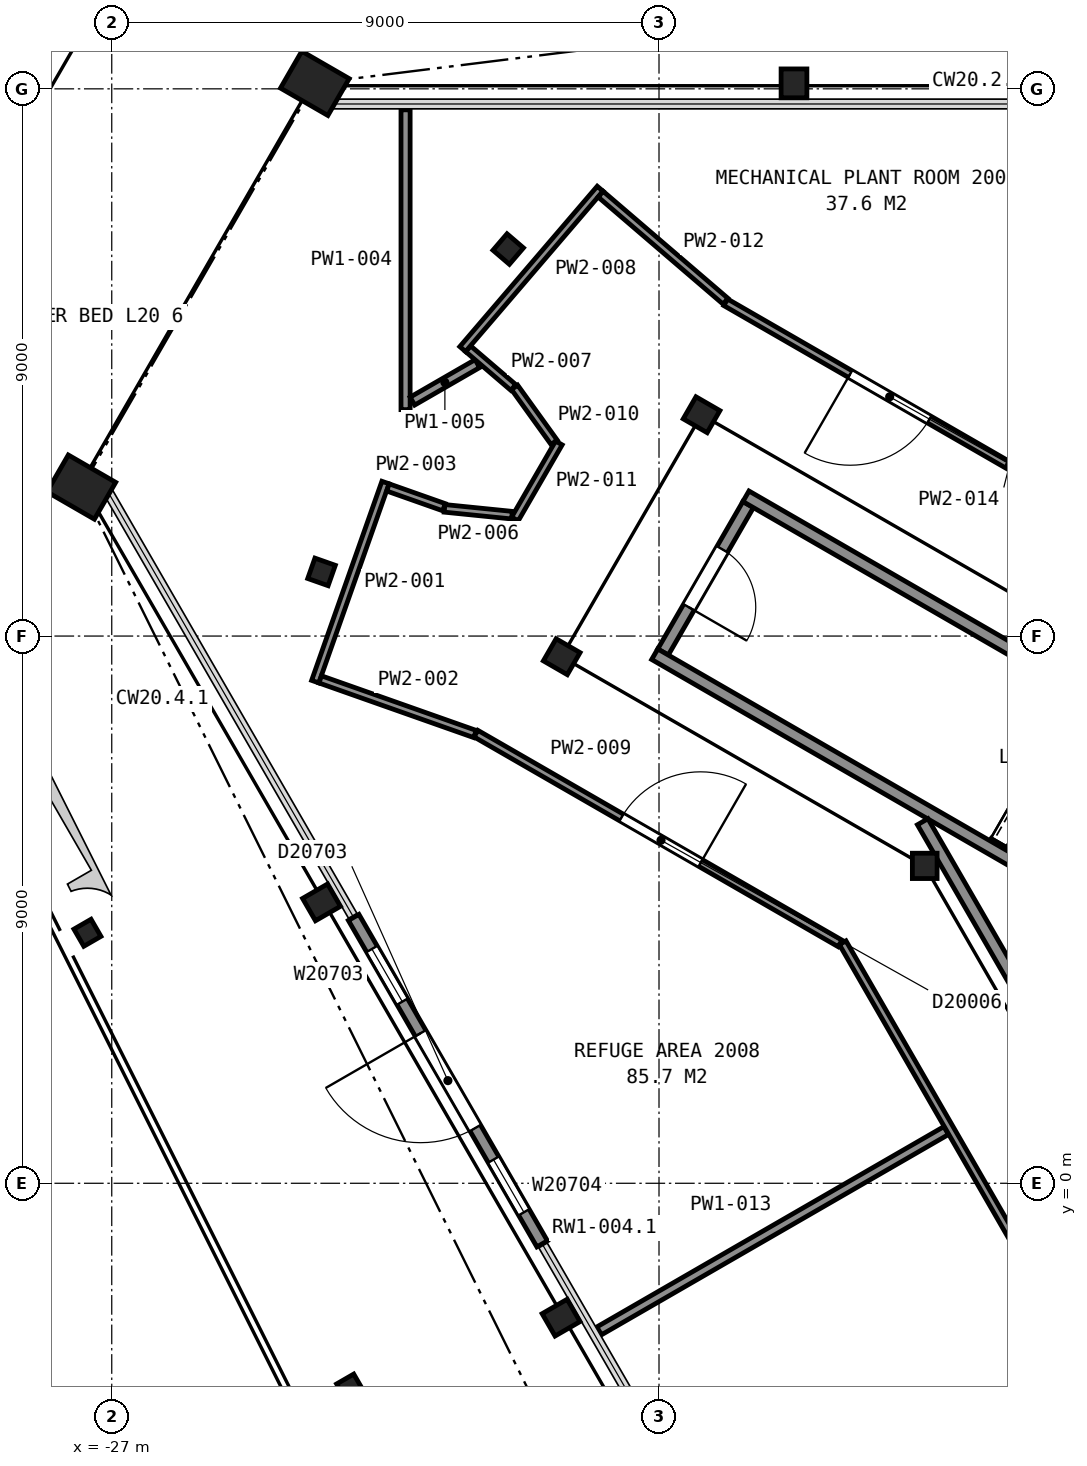
"""IFC4 building model, lengths in metres.
Left out: names, types, materials, properties, quantities, classifications, styles, units other than length and angle.
Written with IfcOpenShell. Run it as: python <this file> out.ifc"""

import sys

from ifc_helpers import new_model, si_unit, direction, frame, frame_2d, origin, origin_2d, place, context, subcontext, project, spatial, rectangle, hollow_rectangle, hollow_circle, i_section, extrude, element, fill, save


model = new_model("IFC4")
c1 = context("Model", 3, precision=1e-05, world=origin(), true_north=direction((0.0, 1.0)))
c2 = subcontext(c1, "Body", "Model", "MODEL_VIEW")
j1 = project(units=[si_unit("LENGTHUNIT", "METRE"), si_unit("PLANEANGLEUNIT", "RADIAN")], contexts=[c1])
p1 = place(None, origin())
s1 = spatial("IfcSite", under=j1, at=p1, CompositionType="ELEMENT")
p2 = place(p1, origin())
s2 = spatial("IfcBuilding", under=s1, at=p2, CompositionType="ELEMENT")
p3 = place(p2, frame((0.0, 0.0, 87.2)))
s3 = spatial("IfcBuildingStorey", under=s2, at=p3, CompositionType="ELEMENT", Elevation=87.2)
p4 = place(p3, frame((-15.78, 18.09, -0.16), z_axis=(0.0, 0.0, 1.0), x_axis=(1.0, 0.0, 0.0)))
e1 = element("IfcColumn", 1, at=p4, inside=s3, PredefinedType="COLUMN", context=c2, shape_type="SweptSolid", body=[
    extrude(i_section(OverallWidth=0.424, OverallDepth=0.475, WebThickness=0.048, FlangeThickness=0.077, FilletRadius=0.015, at=origin_2d()), origin(), (0.0, 0.0, 1.0), 5.76),
])
for number, where, z_axis, x_axis in (
    (2, (-23.66, 18.09, -0.16), (0.0, 0.0, 1.0), (0.5, 0.866, 0.0)),
    (3, (-27.5, 11.45, -0.16), (0.0, 0.0, 1.0), (0.5, 0.866, 0.0)),
):
    element("IfcColumn", number, at=place(p3, frame(where, z_axis=z_axis, x_axis=x_axis)), inside=s3, PredefinedType="COLUMN", context=c2, shape_type="SweptSolid", body=[
        extrude(hollow_rectangle(XDim=0.7, YDim=0.9, WallThickness=0.065, at=origin_2d()), origin(), (0.0, 0.0, 1.0), 5.76),
    ])
for number, where, z_axis, x_axis in (
    (4, (-23.55, 4.62, -0.16), (0.0, 0.0, 1.0), (-0.5, 0.866, 0.0)),
    (5, (-19.61, -2.21, -0.16), (0.0, 0.0, 1.0), (-0.5, 0.866, 0.0)),
):
    element("IfcColumn", number, at=place(p3, frame(where, z_axis=z_axis, x_axis=x_axis)), inside=s3, PredefinedType="COLUMN", context=c2, shape_type="SweptSolid", body=[
        extrude(i_section(OverallWidth=0.424, OverallDepth=0.475, WebThickness=0.048, FlangeThickness=0.077, FilletRadius=0.015, at=origin_2d()), origin(), (0.0, 0.0, 1.0), 5.76),
    ])
for number, where, z_axis, x_axis in (
    (6, (-17.3, 12.64, 0.0), (0.0, 0.0, 1.0), (0.5, 0.866, 0.0)),
    (7, (-19.6, 8.66, 0.0), (0.0, 0.0, 1.0), (0.5, 0.866, 0.0)),
):
    element("IfcColumn", number, at=place(p3, frame(where, z_axis=z_axis, x_axis=x_axis)), inside=s3, PredefinedType="COLUMN", context=c2, shape_type="SweptSolid", body=[
        extrude(i_section(OverallWidth=0.419, OverallDepth=0.455, WebThickness=0.042, FlangeThickness=0.068, FilletRadius=0.015, at=origin_2d()), origin(), (0.0, 0.0, 1.0), 5.6),
    ])
p5 = place(p3, frame((-13.63, 5.22, 0.0), z_axis=(0.0, 0.0, 1.0), x_axis=(1.0, 0.0, 0.0)))
e8 = element("IfcColumn", 8, at=p5, inside=s3, PredefinedType="COLUMN", context=c2, shape_type="SweptSolid", body=[
    extrude(i_section(OverallWidth=0.406, OverallDepth=0.417, WebThickness=0.03, FlangeThickness=0.048, FilletRadius=0.015, at=origin_2d()), origin(), (0.0, 0.0, 1.0), 5.6),
])
for number, where, z_axis, x_axis in (
    (9, (-27.4, 4.12, -0.73), (0.0, 0.0, 1.0), (-0.5, 0.866, 0.0)),
    (10, (-23.08, -3.36, -0.73), (0.0, 0.0, 1.0), (-0.5, 0.866, 0.0)),
):
    element("IfcColumn", number, at=place(p3, frame(where, z_axis=z_axis, x_axis=x_axis)), inside=s3, PredefinedType="COLUMN", context=c2, shape_type="SweptSolid", body=[
        extrude(hollow_circle(Radius=0.163, WallThickness=0.013, at=origin_2d()), origin(), (0.0, 0.0, 1.0), 5.17),
    ])
for number, where, z_axis, x_axis in (
    (11, (-20.48, 15.365, -0.16), (0.0, 0.0, 1.0), (-0.651, -0.759, 0.0)),
    (12, (-23.55, 10.055, -0.16), (0.0, 0.0, 1.0), (-0.333, -0.943, 0.0)),
):
    element("IfcColumn", number, at=place(p3, frame(where, z_axis=z_axis, x_axis=x_axis)), inside=s3, PredefinedType="COLUMN", context=c2, shape_type="SweptSolid", body=[
        extrude(hollow_rectangle(XDim=0.356, YDim=0.356, WallThickness=0.013, InnerFilletRadius=0.006, OuterFilletRadius=0.019, at=origin_2d()), origin(), (0.0, 0.0, 1.0), 5.6),
    ])
p6 = place(p3, frame((-23.022, 4.373, 0.0), z_axis=(0.0, 0.0, 1.0), x_axis=(0.500009909098, -0.866019682689, 0.0)))
e13 = element("IfcWall", 13, at=p6, inside=s3, PredefinedType="SOLIDWALL", context=c2, shape_type="SweptSolid", body=[
    extrude(rectangle(XDim=6.2, YDim=0.2, at=frame_2d((3.1, 0.0))), origin(), (0.0, 0.0, 1.0), 4.323),
])
p7 = place(p6, frame((0.6, 0.0, 0.9)))
e14 = element("IfcOpeningElement", 14, at=p7, cuts=e13, PredefinedType="OPENING", context=c2, shape_type="SweptSolid", body=[
    extrude(rectangle(XDim=1.0, YDim=1.5, at=frame_2d((0.5, 0.75))), frame((0.0, 0.11, 0.0), z_axis=(0.0, -1.0, 0.0), x_axis=(1.0, 0.0, 0.0)), (0.0, 0.0, 1.0), 0.22),
])
p8 = place(p6, frame((2.2, 0.0, 0.0)))
e15 = element("IfcOpeningElement", 15, at=p8, cuts=e13, PredefinedType="OPENING", context=c2, shape_type="SweptSolid", body=[
    extrude(rectangle(XDim=1.8, YDim=2.4, at=frame_2d((0.9, 1.2))), frame((0.0, 0.11, 0.0), z_axis=(0.0, -1.0, 0.0), x_axis=(1.0, 0.0, 0.0)), (0.0, 0.0, 1.0), 0.22),
])
p9 = place(p6, frame((4.6, 0.0, 0.9)))
e16 = element("IfcOpeningElement", 16, at=p9, cuts=e13, PredefinedType="OPENING", context=c2, shape_type="SweptSolid", body=[
    extrude(rectangle(XDim=1.0, YDim=1.5, at=frame_2d((0.5, 0.75))), frame((0.0, 0.11, 0.0), z_axis=(0.0, -1.0, 0.0), x_axis=(1.0, 0.0, 0.0)), (0.0, 0.0, 1.0), 0.22),
])
p10 = place(p3, frame((-16.534, 11.162, 0.0), z_axis=(0.0, 0.0, 1.0), x_axis=(-0.49998411664, -0.866034573852, 0.0)))
e17 = element("IfcWall", 17, at=p10, inside=s3, PredefinedType="PARTITIONING", context=c2, shape_type="SweptSolid", body=[
    extrude(rectangle(XDim=2.8, YDim=0.2, at=frame_2d((1.4, 0.0))), origin(), (0.0, 0.0, 1.0), 5.35),
])
p11 = place(p10, frame((0.85, 0.0, 0.0)))
e18 = element("IfcOpeningElement", 18, at=p11, cuts=e17, PredefinedType="OPENING", context=c2, shape_type="SweptSolid", body=[
    extrude(rectangle(XDim=1.1, YDim=2.1, at=frame_2d((0.55, 1.05))), frame((0.0, 0.11, 0.0), z_axis=(0.0, -1.0, 0.0), x_axis=(1.0, 0.0, 0.0)), (0.0, 0.0, 1.0), 0.22),
])
for number, where, z_axis, x_axis in (
    (19, (-7.678, 2.701, 0.0), (0.0, 0.0, 1.0), (-0.866, 0.5, 0.0)),
    (20, (-6.178, 5.299, 0.0), (0.0, 0.0, 1.0), (-0.866, 0.5, 0.0)),
):
    element("IfcWall", number, at=place(p3, frame(where, z_axis=z_axis, x_axis=x_axis)), inside=s3, PredefinedType="PARTITIONING", context=c2, shape_type="SweptSolid", body=[
        extrude(rectangle(XDim=12.0, YDim=0.2, at=frame_2d((6.0, 0.0))), origin(), (0.0, 0.0, 1.0), 5.35),
    ])
p12 = place(p3, frame((-13.664, 5.946, 0.0), z_axis=(0.0, 0.0, 1.0), x_axis=(0.499994327219, -0.866028678941, 0.0)))
e21 = element("IfcWall", 21, at=p12, inside=s3, PredefinedType="PARTITIONING", context=c2, shape_type="SweptSolid", body=[
    extrude(rectangle(XDim=23.968, YDim=0.2, at=frame_2d((11.984, 0.0))), origin(), (0.0, 0.0, 1.0), 5.35),
])
p13 = place(p3, frame((-23.654, 8.25, 0.0), z_axis=(0.0, 0.0, 1.0), x_axis=(0.332735538655, 0.943020180757, 0.0)))
e22 = element("IfcWall", 22, at=p13, inside=s3, PredefinedType="PARTITIONING", context=c2, shape_type="SweptSolid", body=[
    extrude(rectangle(XDim=3.473, YDim=0.125, at=frame_2d((1.736, 0.0))), origin(), (0.0, 0.0, 1.0), 4.262),
])
p14 = place(p3, frame((-23.572, 8.287, 0.0), z_axis=(0.0, 0.0, 1.0), x_axis=(0.942973633361, -0.332867431249, 0.0)))
e23 = element("IfcWall", 23, at=p14, inside=s3, PredefinedType="PARTITIONING", context=c2, shape_type="SweptSolid", body=[
    extrude(rectangle(XDim=2.699, YDim=0.125, at=frame_2d((1.35, 0.0))), origin(), (0.0, 0.0, 1.0), 4.262),
])
p15 = place(p3, frame((-22.458, 11.444, 0.0), z_axis=(0.0, 0.0, 1.0), x_axis=(0.942994942742, -0.332807058161, 0.0)))
e24 = element("IfcWall", 24, at=p15, inside=s3, PredefinedType="PARTITIONING", context=c2, shape_type="SweptSolid", body=[
    extrude(rectangle(XDim=0.978, YDim=0.125, at=frame_2d((0.489, 0.0))), origin(), (0.0, 0.0, 1.0), 4.262),
])
p16 = place(p3, frame((-22.168, 12.724, 0.0), z_axis=(0.0, 0.0, 1.0), x_axis=(0.0, 1.0, 0.0)))
e25 = element("IfcWall", 25, at=p16, inside=s3, PredefinedType="PARTITIONING", context=c2, shape_type="SweptSolid", body=[
    extrude(rectangle(XDim=4.931, YDim=0.15, at=frame_2d((2.465, 0.0))), origin(), (0.0, 0.0, 1.0), 4.262),
])
p17 = place(p3, frame((-22.055, 12.864, 0.0), z_axis=(0.0, 0.0, 1.0), x_axis=(0.86601746898, 0.500013743233, 0.0)))
e26 = element("IfcWall", 26, at=p17, inside=s3, PredefinedType="PARTITIONING", context=c2, shape_type="SweptSolid", body=[
    extrude(rectangle(XDim=1.233, YDim=0.15, at=frame_2d((0.617, 0.0))), origin(), (0.0, 0.0, 1.0), 4.262),
])
p18 = place(p3, frame((-21.527, 11.1, 0.0), z_axis=(0.0, 0.0, 1.0), x_axis=(0.994917271195, -0.100695697415, 0.0)))
e27 = element("IfcWall", 27, at=p18, inside=s3, PredefinedType="PARTITIONING", context=c2, shape_type="SweptSolid", body=[
    extrude(rectangle(XDim=1.115, YDim=0.125, at=frame_2d((0.558, 0.0))), origin(), (0.0, 0.0, 1.0), 4.262),
])
p19 = place(p3, frame((-21.139, 13.725, 0.0), z_axis=(0.0, 0.0, 1.0), x_axis=(0.759679514404, -0.650297651383, 0.0)))
e28 = element("IfcWall", 28, at=p19, inside=s3, PredefinedType="PARTITIONING", context=c2, shape_type="SweptSolid", body=[
    extrude(rectangle(XDim=0.978, YDim=0.125, at=frame_2d((0.489, 0.0))), origin(), (0.0, 0.0, 1.0), 4.262),
])
p20 = place(p3, frame((-21.229, 13.719, 0.0), z_axis=(0.0, 0.0, 1.0), x_axis=(0.650692980458, 0.759340928162, 0.0)))
e29 = element("IfcWall", 29, at=p20, inside=s3, PredefinedType="PARTITIONING", context=c2, shape_type="SweptSolid", body=[
    extrude(rectangle(XDim=3.474, YDim=0.125, at=frame_2d((1.737, 0.0))), origin(), (0.0, 0.0, 1.0), 4.262),
])
p21 = place(p3, frame((-15.022, 3.944, 0.0), z_axis=(0.0, 0.0, 1.0), x_axis=(-0.866435403895, 0.49928918562, 0.0)))
e30 = element("IfcWall", 30, at=p21, inside=s3, PredefinedType="PARTITIONING", context=c2, shape_type="SweptSolid", body=[
    extrude(rectangle(XDim=6.912, YDim=0.125, at=frame_2d((3.456, 0.0))), origin(), (0.0, 0.0, 1.0), 4.262),
])
p22 = place(p21, frame((2.649, 0.0, 0.0)))
e31 = element("IfcOpeningElement", 31, at=p22, cuts=e30, PredefinedType="OPENING", context=c2, shape_type="SweptSolid", body=[
    extrude(rectangle(XDim=1.5, YDim=2.1, at=frame_2d((0.75, 1.05))), frame((0.0, 0.073, 0.0), z_axis=(0.0, -1.0, 0.0), x_axis=(1.0, 0.0, 0.0)), (0.0, 0.0, 1.0), 0.145),
])
p23 = place(p3, frame((-20.375, 13.091, 0.0), z_axis=(0.0, 0.0, 1.0), x_axis=(0.584241196602, -0.811580078731, 0.0)))
e32 = element("IfcWall", 32, at=p23, inside=s3, PredefinedType="PARTITIONING", context=c2, shape_type="SweptSolid", body=[
    extrude(rectangle(XDim=1.114, YDim=0.125, at=frame_2d((0.557, 0.0))), origin(), (0.0, 0.0, 1.0), 4.262),
])
p24 = place(p3, frame((-20.369, 10.926, 0.0), z_axis=(0.0, 0.0, 1.0), x_axis=(0.500429691499, 0.865777179109, 0.0)))
e33 = element("IfcWall", 33, at=p24, inside=s3, PredefinedType="PARTITIONING", context=c2, shape_type="SweptSolid", body=[
    extrude(rectangle(XDim=1.444, YDim=0.125, at=frame_2d((0.722, 0.0))), origin(), (0.0, 0.0, 1.0), 4.262),
])
p25 = place(p3, frame((-18.96, 16.268, 0.0), z_axis=(0.0, 0.0, 1.0), x_axis=(0.759180150355, -0.650880556866, 0.0)))
e34 = element("IfcWall", 34, at=p25, inside=s3, PredefinedType="PARTITIONING", context=c2, shape_type="SweptSolid", body=[
    extrude(rectangle(XDim=2.705, YDim=0.125, at=frame_2d((1.353, 0.0))), origin(), (0.0, 0.0, 1.0), 4.262),
])
p26 = place(p3, frame((-18.985, -2.428, 0.0), z_axis=(0.0, 0.0, 1.0), x_axis=(0.866064687971, 0.499931951619, 0.0)))
e35 = element("IfcWall", 35, at=p26, inside=s3, PredefinedType="PARTITIONING", context=c2, shape_type="SweptSolid", body=[
    extrude(rectangle(XDim=6.591, YDim=0.15, at=frame_2d((3.295, 0.0))), origin(), (0.0, 0.0, 1.0), 4.262),
])
p27 = place(p3, frame((-16.903, 14.489, 0.0), z_axis=(0.0, 0.0, 1.0), x_axis=(0.866404548649, -0.499342726071, 0.0)))
e36 = element("IfcWall", 36, at=p27, inside=s3, PredefinedType="PARTITIONING", context=c2, shape_type="SweptSolid", body=[
    extrude(rectangle(XDim=6.903, YDim=0.125, at=frame_2d((3.451, 0.0))), origin(), (0.0, 0.0, 1.0), 4.262),
])
p28 = place(p27, frame((2.363, 0.0, 0.0)))
e37 = element("IfcOpeningElement", 37, at=p28, cuts=e36, PredefinedType="OPENING", context=c2, shape_type="SweptSolid", body=[
    extrude(rectangle(XDim=1.5, YDim=2.1, at=frame_2d((0.75, 1.05))), frame((0.0, 0.073, 0.0), z_axis=(0.0, -1.0, 0.0), x_axis=(1.0, 0.0, 0.0)), (0.0, 0.0, 1.0), 0.145),
])
p29 = place(p3, frame((-14.979, 3.956, 0.0), z_axis=(0.0, 0.0, 1.0), x_axis=(0.499335058772, -0.866408967568, 0.0)))
e38 = element("IfcWall", 38, at=p29, inside=s3, PredefinedType="PARTITIONING", context=c2, shape_type="SweptSolid", body=[
    extrude(rectangle(XDim=10.913, YDim=0.125, at=frame_2d((5.457, 0.0))), origin(), (0.0, 0.0, 1.0), 4.262),
])
p30 = place(p7, origin())
e39 = element("IfcWindow", 39, at=p30, inside=s3, PartitioningType="SINGLE_PANEL", PredefinedType="WINDOW", context=c2, shape_type="SweptSolid", body=[
    extrude(rectangle(XDim=1.0, YDim=1.5, at=frame_2d((0.5, 0.75))), frame((0.0, 0.03, 0.0), z_axis=(0.0, -1.0, 0.0), x_axis=(1.0, 0.0, 0.0)), (0.0, 0.0, 1.0), 0.06),
])
fill(e14, e39)
p31 = place(p8, frame((1.8, 0.0, 0.0), z_axis=(0.0, 0.0, 1.0), x_axis=(-1.0, 0.0, 0.0)))
e40 = element("IfcDoor", 40, at=p31, inside=s3, OperationType="DOUBLE_DOOR_SINGLE_SWING", PredefinedType="DOOR", context=c2, shape_type="SweptSolid", body=[
    extrude(rectangle(XDim=1.8, YDim=2.4, at=frame_2d((0.9, 1.2))), frame((0.0, 0.025, 0.0), z_axis=(0.0, -1.0, 0.0), x_axis=(1.0, 0.0, 0.0)), (0.0, 0.0, 1.0), 0.05),
])
fill(e15, e40)
p32 = place(p9, origin())
e41 = element("IfcWindow", 41, at=p32, inside=s3, PartitioningType="SINGLE_PANEL", PredefinedType="WINDOW", context=c2, shape_type="SweptSolid", body=[
    extrude(rectangle(XDim=1.0, YDim=1.5, at=frame_2d((0.5, 0.75))), frame((0.0, 0.03, 0.0), z_axis=(0.0, -1.0, 0.0), x_axis=(1.0, 0.0, 0.0)), (0.0, 0.0, 1.0), 0.06),
])
fill(e16, e41)
p33 = place(p11, origin())
e42 = element("IfcDoor", 42, at=p33, inside=s3, OperationType="SINGLE_SWING_RIGHT", PredefinedType="DOOR", context=c2, shape_type="SweptSolid", body=[
    extrude(rectangle(XDim=1.1, YDim=2.1, at=frame_2d((0.55, 1.05))), frame((0.0, 0.025, 0.0), z_axis=(0.0, -1.0, 0.0), x_axis=(1.0, 0.0, 0.0)), (0.0, 0.0, 1.0), 0.05),
])
fill(e18, e42)
p34 = place(p22, origin())
e43 = element("IfcDoor", 43, at=p34, inside=s3, OperationType="DOUBLE_DOOR_SINGLE_SWING", PredefinedType="DOOR", context=c2, shape_type="SweptSolid", body=[
    extrude(rectangle(XDim=1.5, YDim=2.1, at=frame_2d((0.75, 1.05))), frame((0.0, 0.025, 0.0), z_axis=(0.0, -1.0, 0.0), x_axis=(1.0, 0.0, 0.0)), (0.0, 0.0, 1.0), 0.05),
])
fill(e31, e43)
p35 = place(p28, origin())
e44 = element("IfcDoor", 44, at=p35, inside=s3, OperationType="DOUBLE_DOOR_SINGLE_SWING", PredefinedType="DOOR", context=c2, shape_type="SweptSolid", body=[
    extrude(rectangle(XDim=1.5, YDim=2.1, at=frame_2d((0.75, 1.05))), frame((0.0, 0.025, 0.0), z_axis=(0.0, -1.0, 0.0), x_axis=(1.0, 0.0, 0.0)), (0.0, 0.0, 1.0), 0.05),
])
fill(e37, e44)
save(model, sys.argv[1])
